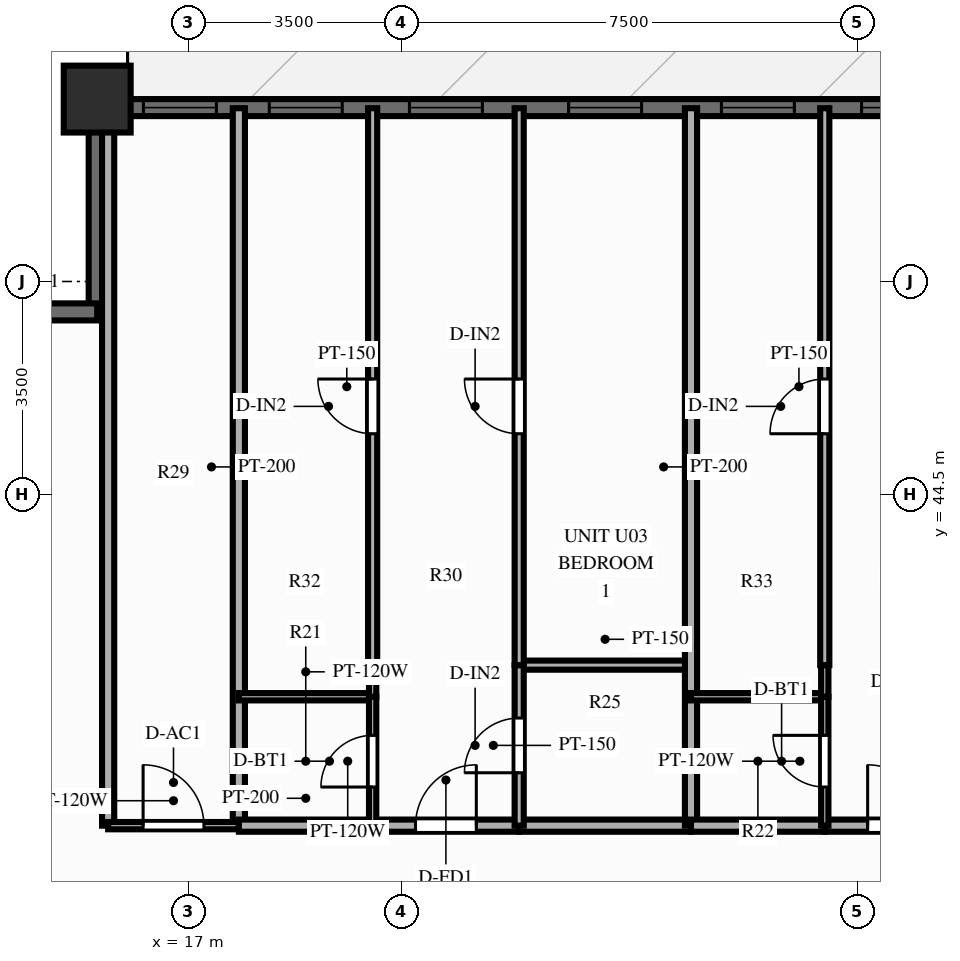
"""IFC4 building model, lengths in metres.
Left out: names, types, materials, properties, quantities, classifications, styles, units other than length and angle.
Written with IfcOpenShell. Run it as: python <this file> out.ifc"""

import sys

from ifc_helpers import new_model, si_unit, direction, frame, frame_2d, origin, origin_2d, place, context, subcontext, project, spatial, rectangle, extrude, source, transform, mapped, element, fill, save


model = new_model("IFC4")
c1 = context("Model", 3, precision=1e-05, world=origin(), true_north=direction((0.0, 1.0)))
c2 = subcontext(c1, "Body", "Model", "MODEL_VIEW")
j1 = project(units=[si_unit("LENGTHUNIT", "METRE"), si_unit("PLANEANGLEUNIT", "RADIAN")], contexts=[c1])
p1 = place(None, origin())
s1 = spatial("IfcSite", under=j1, at=p1, CompositionType="ELEMENT")
p2 = place(p1, origin())
s2 = spatial("IfcBuilding", under=s1, at=p2, CompositionType="ELEMENT")
p3 = place(p2, frame((0.0, 0.0, 46.4)))
s3 = spatial("IfcBuildingStorey", under=s2, at=p3, CompositionType="ELEMENT", Elevation=46.4)
m1 = source(origin(), c2, "Body", "SweptSolid", [
    extrude(rectangle(XDim=1.1, YDim=1.1, at=origin_2d()), origin(), (0.0, 0.0, 1.0), 3.0),
])
p4 = place(p3, frame((15.5, 51.0, 0.0), z_axis=(0.0, 0.0, 1.0), x_axis=(1.0, 0.0, 0.0)))
e1 = element("IfcColumn", 1, at=p4, inside=s3, PredefinedType="COLUMN", context=c2, shape_type="MappedRepresentation", body=[
    mapped(m1, transform((0.0, 0.0, 0.0), scale=1.0)),
])
p5 = place(p3, frame((15.5, 50.86, 0.0), z_axis=(0.0, 0.0, 1.0), x_axis=(1.0, 0.0, 0.0)))
e2 = element("IfcWall", 2, at=p5, inside=s3, PredefinedType="SOLIDWALL", context=c2, shape_type="SweptSolid", body=[
    extrude(rectangle(XDim=45.0, YDim=0.28, at=frame_2d((22.5, 0.0))), origin(), (0.0, 0.0, 1.0), 2.28),
])
p6 = place(p5, frame((0.76, 0.0, 0.25)))
e3 = element("IfcOpeningElement", 3, at=p6, cuts=e2, PredefinedType="OPENING", context=c2, shape_type="SweptSolid", body=[
    extrude(rectangle(XDim=1.2, YDim=1.5, at=frame_2d((0.6, 0.75))), frame((0.0, 0.152, 0.0), z_axis=(0.0, -1.0, 0.0), x_axis=(1.0, 0.0, 0.0)), (0.0, 0.0, 1.0), 0.304),
])
p7 = place(p5, frame((2.83, 0.0, 0.25)))
e4 = element("IfcOpeningElement", 4, at=p7, cuts=e2, PredefinedType="OPENING", context=c2, shape_type="SweptSolid", body=[
    extrude(rectangle(XDim=1.2, YDim=1.5, at=frame_2d((0.6, 0.75))), frame((0.0, 0.152, 0.0), z_axis=(0.0, -1.0, 0.0), x_axis=(1.0, 0.0, 0.0)), (0.0, 0.0, 1.0), 0.304),
])
p8 = place(p5, frame((5.135, 0.0, 0.25)))
e5 = element("IfcOpeningElement", 5, at=p8, cuts=e2, PredefinedType="OPENING", context=c2, shape_type="SweptSolid", body=[
    extrude(rectangle(XDim=1.2, YDim=1.5, at=frame_2d((0.6, 0.75))), frame((0.0, 0.152, 0.0), z_axis=(0.0, -1.0, 0.0), x_axis=(1.0, 0.0, 0.0)), (0.0, 0.0, 1.0), 0.304),
])
p9 = place(p5, frame((7.753, 0.0, 0.25)))
e6 = element("IfcOpeningElement", 6, at=p9, cuts=e2, PredefinedType="OPENING", context=c2, shape_type="SweptSolid", body=[
    extrude(rectangle(XDim=1.2, YDim=1.5, at=frame_2d((0.6, 0.75))), frame((0.0, 0.152, 0.0), z_axis=(0.0, -1.0, 0.0), x_axis=(1.0, 0.0, 0.0)), (0.0, 0.0, 1.0), 0.304),
])
p10 = place(p5, frame((10.266, 0.0, 0.25)))
e7 = element("IfcOpeningElement", 7, at=p10, cuts=e2, PredefinedType="OPENING", context=c2, shape_type="SweptSolid", body=[
    extrude(rectangle(XDim=1.2, YDim=1.5, at=frame_2d((0.6, 0.75))), frame((0.0, 0.152, 0.0), z_axis=(0.0, -1.0, 0.0), x_axis=(1.0, 0.0, 0.0)), (0.0, 0.0, 1.0), 0.304),
])
p11 = place(p5, frame((12.571, 0.0, 0.25)))
e8 = element("IfcOpeningElement", 8, at=p11, cuts=e2, PredefinedType="OPENING", context=c2, shape_type="SweptSolid", body=[
    extrude(rectangle(XDim=1.2, YDim=1.5, at=frame_2d((0.6, 0.75))), frame((0.0, 0.152, 0.0), z_axis=(0.0, -1.0, 0.0), x_axis=(1.0, 0.0, 0.0)), (0.0, 0.0, 1.0), 0.304),
])
p12 = place(p5, frame((14.643, 0.0, 0.25)))
e9 = element("IfcOpeningElement", 9, at=p12, cuts=e2, PredefinedType="OPENING", context=c2, shape_type="SweptSolid", body=[
    extrude(rectangle(XDim=0.7, YDim=1.5, at=frame_2d((0.35, 0.75))), frame((0.0, 0.152, 0.0), z_axis=(0.0, -1.0, 0.0), x_axis=(1.0, 0.0, 0.0)), (0.0, 0.0, 1.0), 0.304),
])
p13 = place(p5, frame((17.977, 0.0, 0.25)))
e10 = element("IfcOpeningElement", 10, at=p13, cuts=e2, PredefinedType="OPENING", context=c2, shape_type="SweptSolid", body=[
    extrude(rectangle(XDim=1.2, YDim=1.5, at=frame_2d((0.6, 0.75))), frame((0.0, 0.152, 0.0), z_axis=(0.0, -1.0, 0.0), x_axis=(1.0, 0.0, 0.0)), (0.0, 0.0, 1.0), 0.304),
])
p14 = place(p5, frame((23.263, 0.0, 0.0)))
e11 = element("IfcOpeningElement", 11, at=p14, cuts=e2, PredefinedType="OPENING", context=c2, shape_type="SweptSolid", body=[
    extrude(rectangle(XDim=1.1, YDim=2.15, at=frame_2d((0.55, 1.075))), frame((0.0, 0.152, 0.0), z_axis=(0.0, -1.0, 0.0), x_axis=(1.0, 0.0, 0.0)), (0.0, 0.0, 1.0), 0.304),
])
p15 = place(p5, frame((29.832, 0.0, 0.25)))
e12 = element("IfcOpeningElement", 12, at=p15, cuts=e2, PredefinedType="OPENING", context=c2, shape_type="SweptSolid", body=[
    extrude(rectangle(XDim=0.95, YDim=1.5, at=frame_2d((0.475, 0.75))), frame((0.0, 0.152, 0.0), z_axis=(0.0, -1.0, 0.0), x_axis=(1.0, 0.0, 0.0)), (0.0, 0.0, 1.0), 0.304),
])
p16 = place(p5, frame((31.998, 0.0, 0.25)))
e13 = element("IfcOpeningElement", 13, at=p16, cuts=e2, PredefinedType="OPENING", context=c2, shape_type="SweptSolid", body=[
    extrude(rectangle(XDim=1.2, YDim=1.5, at=frame_2d((0.6, 0.75))), frame((0.0, 0.152, 0.0), z_axis=(0.0, -1.0, 0.0), x_axis=(1.0, 0.0, 0.0)), (0.0, 0.0, 1.0), 0.304),
])
p17 = place(p5, frame((37.023, 0.0, 0.25)))
e14 = element("IfcOpeningElement", 14, at=p17, cuts=e2, PredefinedType="OPENING", context=c2, shape_type="SweptSolid", body=[
    extrude(rectangle(XDim=1.2, YDim=1.5, at=frame_2d((0.6, 0.75))), frame((0.0, 0.152, 0.0), z_axis=(0.0, -1.0, 0.0), x_axis=(1.0, 0.0, 0.0)), (0.0, 0.0, 1.0), 0.304),
])
p18 = place(p5, frame((42.341, 0.0, 0.25)))
e15 = element("IfcOpeningElement", 15, at=p18, cuts=e2, PredefinedType="OPENING", context=c2, shape_type="SweptSolid", body=[
    extrude(rectangle(XDim=1.2, YDim=1.5, at=frame_2d((0.6, 0.75))), frame((0.0, 0.152, 0.0), z_axis=(0.0, -1.0, 0.0), x_axis=(1.0, 0.0, 0.0)), (0.0, 0.0, 1.0), 0.304),
])
for number, where, z_axis, x_axis in (
    (16, (15.5, 47.5, 0.0), (0.0, 0.0, 1.0), (0.0, 1.0, 0.0)),
    (17, (12.08, 47.5, 0.0), (0.0, 0.0, 1.0), (1.0, 0.0, 0.0)),
):
    element("IfcWall", number, at=place(p3, frame(where, z_axis=z_axis, x_axis=x_axis)), inside=s3, PredefinedType="SOLIDWALL", context=c2, shape_type="SweptSolid", body=[
        extrude(rectangle(XDim=3.42, YDim=0.28, at=frame_2d((1.71, 0.0))), origin(), (0.0, 0.0, 1.0), 2.28),
    ])
for number, where, z_axis, x_axis in (
    (18, (15.68, 39.05, 0.0), (0.0, 0.0, 1.0), (0.0, 1.0, 0.0)),
    (19, (17.83, 39.05, 0.0), (0.0, 0.0, 1.0), (0.0, 1.0, 0.0)),
):
    element("IfcWall", number, at=place(p3, frame(where, z_axis=z_axis, x_axis=x_axis)), inside=s3, PredefinedType="PARTITIONING", context=c2, shape_type="SweptSolid", body=[
        extrude(rectangle(XDim=11.8, YDim=0.2, at=frame_2d((5.9, 0.0))), origin(), (0.0, 0.0, 1.0), 2.79),
    ])
p19 = place(p3, frame((15.68, 39.05, 0.0), z_axis=(0.0, 0.0, 1.0), x_axis=(1.0, 0.0, 0.0)))
e20 = element("IfcWall", 20, at=p19, inside=s3, PredefinedType="PARTITIONING", context=c2, shape_type="SweptSolid", body=[
    extrude(rectangle(XDim=2.15, YDim=0.12, at=frame_2d((1.075, 0.0))), origin(), (0.0, 0.0, 1.0), 2.79),
])
p20 = place(p19, frame((0.575, 0.0, 0.0)))
e21 = element("IfcOpeningElement", 21, at=p20, cuts=e20, PredefinedType="OPENING", context=c2, shape_type="SweptSolid", body=[
    extrude(rectangle(XDim=1.0, YDim=2.1, at=frame_2d((0.5, 1.05))), frame((0.0, 0.072, 0.0), z_axis=(0.0, -1.0, 0.0), x_axis=(1.0, 0.0, 0.0)), (0.0, 0.0, 1.0), 0.144),
])
p21 = place(p3, frame((17.83, 39.05, 0.0), z_axis=(0.0, 0.0, 1.0), x_axis=(1.0, 0.0, 0.0)))
e22 = element("IfcWall", 22, at=p21, inside=s3, PredefinedType="PARTITIONING", context=c2, shape_type="SweptSolid", body=[
    extrude(rectangle(XDim=2.2, YDim=0.2, at=frame_2d((1.1, 0.0))), origin(), (0.0, 0.0, 1.0), 2.79),
])
p22 = place(p3, frame((20.03, 39.05, 0.0), z_axis=(0.0, 0.0, 1.0), x_axis=(1.0, 0.0, 0.0)))
e23 = element("IfcWall", 23, at=p22, inside=s3, PredefinedType="PARTITIONING", context=c2, shape_type="SweptSolid", body=[
    extrude(rectangle(XDim=2.41, YDim=0.2, at=frame_2d((1.205, 0.0))), origin(), (0.0, 0.0, 1.0), 2.79),
])
p23 = place(p22, frame((0.705, 0.0, 0.0)))
e24 = element("IfcOpeningElement", 24, at=p23, cuts=e23, PredefinedType="OPENING", context=c2, shape_type="SweptSolid", body=[
    extrude(rectangle(XDim=1.0, YDim=2.15, at=frame_2d((0.5, 1.075))), frame((0.0, 0.112, 0.0), z_axis=(0.0, -1.0, 0.0), x_axis=(1.0, 0.0, 0.0)), (0.0, 0.0, 1.0), 0.224),
])
p24 = place(p3, frame((22.44, 39.05, 0.0), z_axis=(0.0, 0.0, 1.0), x_axis=(1.0, 0.0, 0.0)))
e25 = element("IfcWall", 25, at=p24, inside=s3, PredefinedType="PARTITIONING", context=c2, shape_type="SweptSolid", body=[
    extrude(rectangle(XDim=2.826, YDim=0.2, at=frame_2d((1.413, 0.0))), origin(), (0.0, 0.0, 1.0), 2.79),
])
p25 = place(p3, frame((17.83, 41.17, 0.0), z_axis=(0.0, 0.0, 1.0), x_axis=(1.0, 0.0, 0.0)))
e26 = element("IfcWall", 26, at=p25, inside=s3, PredefinedType="PARTITIONING", context=c2, shape_type="SweptSolid", body=[
    extrude(rectangle(XDim=2.2, YDim=0.12, at=frame_2d((1.1, 0.0))), origin(), (0.0, 0.0, 1.0), 2.79),
])
p26 = place(p3, frame((22.44, 41.69, 0.0), z_axis=(0.0, 0.0, 1.0), x_axis=(1.0, 0.0, 0.0)))
e27 = element("IfcWall", 27, at=p26, inside=s3, PredefinedType="PARTITIONING", context=c2, shape_type="SweptSolid", body=[
    extrude(rectangle(XDim=2.826, YDim=0.15, at=frame_2d((1.413, 0.0))), origin(), (0.0, 0.0, 1.0), 2.79),
])
p27 = place(p3, frame((20.03, 39.05, 0.0), z_axis=(0.0, 0.0, 1.0), x_axis=(0.0, 1.0, 0.0)))
e28 = element("IfcWall", 28, at=p27, inside=s3, PredefinedType="PARTITIONING", context=c2, shape_type="SweptSolid", body=[
    extrude(rectangle(XDim=2.12, YDim=0.12, at=frame_2d((1.06, 0.0))), origin(), (0.0, 0.0, 1.0), 2.79),
])
p28 = place(p27, frame((0.635, 0.0, 0.0)))
e29 = element("IfcOpeningElement", 29, at=p28, cuts=e28, PredefinedType="OPENING", context=c2, shape_type="SweptSolid", body=[
    extrude(rectangle(XDim=0.85, YDim=2.05, at=frame_2d((0.425, 1.025))), frame((0.0, 0.072, 0.0), z_axis=(0.0, -1.0, 0.0), x_axis=(1.0, 0.0, 0.0)), (0.0, 0.0, 1.0), 0.144),
])
p29 = place(p3, frame((20.03, 41.17, 0.0), z_axis=(0.0, 0.0, 1.0), x_axis=(0.0, 1.0, 0.0)))
e30 = element("IfcWall", 30, at=p29, inside=s3, PredefinedType="PARTITIONING", context=c2, shape_type="SweptSolid", body=[
    extrude(rectangle(XDim=0.52, YDim=0.12, at=frame_2d((0.26, 0.0))), origin(), (0.0, 0.0, 1.0), 2.79),
])
p30 = place(p3, frame((20.03, 41.69, 0.0), z_axis=(0.0, 0.0, 1.0), x_axis=(0.0, 1.0, 0.0)))
e31 = element("IfcWall", 31, at=p30, inside=s3, PredefinedType="PARTITIONING", context=c2, shape_type="SweptSolid", body=[
    extrude(rectangle(XDim=9.16, YDim=0.15, at=frame_2d((4.58, 0.0))), origin(), (0.0, 0.0, 1.0), 2.79),
])
p31 = place(p30, frame((3.806, 0.0, 0.0)))
e32 = element("IfcOpeningElement", 32, at=p31, cuts=e31, PredefinedType="OPENING", context=c2, shape_type="SweptSolid", body=[
    extrude(rectangle(XDim=0.9, YDim=2.1, at=frame_2d((0.45, 1.05))), frame((0.0, 0.087, 0.0), z_axis=(0.0, -1.0, 0.0), x_axis=(1.0, 0.0, 0.0)), (0.0, 0.0, 1.0), 0.174),
])
p32 = place(p3, frame((22.44, 39.05, 0.0), z_axis=(0.0, 0.0, 1.0), x_axis=(0.0, 1.0, 0.0)))
e33 = element("IfcWall", 33, at=p32, inside=s3, PredefinedType="PARTITIONING", context=c2, shape_type="SweptSolid", body=[
    extrude(rectangle(XDim=2.64, YDim=0.15, at=frame_2d((1.32, 0.0))), origin(), (0.0, 0.0, 1.0), 2.79),
])
p33 = place(p32, frame((0.87, 0.0, 0.0)))
e34 = element("IfcOpeningElement", 34, at=p33, cuts=e33, PredefinedType="OPENING", context=c2, shape_type="SweptSolid", body=[
    extrude(rectangle(XDim=0.9, YDim=2.1, at=frame_2d((0.45, 1.05))), frame((0.0, 0.087, 0.0), z_axis=(0.0, -1.0, 0.0), x_axis=(1.0, 0.0, 0.0)), (0.0, 0.0, 1.0), 0.174),
])
p34 = place(p3, frame((22.44, 41.69, 0.0), z_axis=(0.0, 0.0, 1.0), x_axis=(0.0, 1.0, 0.0)))
e35 = element("IfcWall", 35, at=p34, inside=s3, PredefinedType="PARTITIONING", context=c2, shape_type="SweptSolid", body=[
    extrude(rectangle(XDim=9.16, YDim=0.15, at=frame_2d((4.58, 0.0))), origin(), (0.0, 0.0, 1.0), 2.79),
])
p35 = place(p34, frame((3.806, 0.0, 0.0)))
e36 = element("IfcOpeningElement", 36, at=p35, cuts=e35, PredefinedType="OPENING", context=c2, shape_type="SweptSolid", body=[
    extrude(rectangle(XDim=0.9, YDim=2.1, at=frame_2d((0.45, 1.05))), frame((0.0, 0.087, 0.0), z_axis=(0.0, -1.0, 0.0), x_axis=(1.0, 0.0, 0.0)), (0.0, 0.0, 1.0), 0.174),
])
p36 = place(p3, frame((25.266, 39.05, 0.0), z_axis=(0.0, 0.0, 1.0), x_axis=(0.0, 1.0, 0.0)))
e37 = element("IfcWall", 37, at=p36, inside=s3, PredefinedType="PARTITIONING", context=c2, shape_type="SweptSolid", body=[
    extrude(rectangle(XDim=11.8, YDim=0.2, at=frame_2d((5.9, 0.0))), origin(), (0.0, 0.0, 1.0), 2.79),
])
p37 = place(p3, frame((25.266, 39.05, 0.0), z_axis=(0.0, 0.0, 1.0), x_axis=(1.0, 0.0, 0.0)))
e38 = element("IfcWall", 38, at=p37, inside=s3, PredefinedType="PARTITIONING", context=c2, shape_type="SweptSolid", body=[
    extrude(rectangle(XDim=2.2, YDim=0.2, at=frame_2d((1.1, 0.0))), origin(), (0.0, 0.0, 1.0), 2.79),
])
p38 = place(p3, frame((27.466, 39.05, 0.0), z_axis=(0.0, 0.0, 1.0), x_axis=(1.0, 0.0, 0.0)))
e39 = element("IfcWall", 39, at=p38, inside=s3, PredefinedType="PARTITIONING", context=c2, shape_type="SweptSolid", body=[
    extrude(rectangle(XDim=2.41, YDim=0.2, at=frame_2d((1.205, 0.0))), origin(), (0.0, 0.0, 1.0), 2.79),
])
p39 = place(p38, frame((0.705, 0.0, 0.0)))
e40 = element("IfcOpeningElement", 40, at=p39, cuts=e39, PredefinedType="OPENING", context=c2, shape_type="SweptSolid", body=[
    extrude(rectangle(XDim=1.0, YDim=2.15, at=frame_2d((0.5, 1.075))), frame((0.0, 0.112, 0.0), z_axis=(0.0, -1.0, 0.0), x_axis=(1.0, 0.0, 0.0)), (0.0, 0.0, 1.0), 0.224),
])
p40 = place(p3, frame((25.266, 41.17, 0.0), z_axis=(0.0, 0.0, 1.0), x_axis=(1.0, 0.0, 0.0)))
e41 = element("IfcWall", 41, at=p40, inside=s3, PredefinedType="PARTITIONING", context=c2, shape_type="SweptSolid", body=[
    extrude(rectangle(XDim=2.2, YDim=0.12, at=frame_2d((1.1, 0.0))), origin(), (0.0, 0.0, 1.0), 2.79),
])
p41 = place(p3, frame((27.466, 39.05, 0.0), z_axis=(0.0, 0.0, 1.0), x_axis=(0.0, 1.0, 0.0)))
e42 = element("IfcWall", 42, at=p41, inside=s3, PredefinedType="PARTITIONING", context=c2, shape_type="SweptSolid", body=[
    extrude(rectangle(XDim=2.12, YDim=0.12, at=frame_2d((1.06, 0.0))), origin(), (0.0, 0.0, 1.0), 2.79),
])
p42 = place(p41, frame((0.635, 0.0, 0.0)))
e43 = element("IfcOpeningElement", 43, at=p42, cuts=e42, PredefinedType="OPENING", context=c2, shape_type="SweptSolid", body=[
    extrude(rectangle(XDim=0.85, YDim=2.05, at=frame_2d((0.425, 1.025))), frame((0.0, 0.072, 0.0), z_axis=(0.0, -1.0, 0.0), x_axis=(1.0, 0.0, 0.0)), (0.0, 0.0, 1.0), 0.144),
])
p43 = place(p3, frame((27.466, 41.17, 0.0), z_axis=(0.0, 0.0, 1.0), x_axis=(0.0, 1.0, 0.0)))
e44 = element("IfcWall", 44, at=p43, inside=s3, PredefinedType="PARTITIONING", context=c2, shape_type="SweptSolid", body=[
    extrude(rectangle(XDim=0.52, YDim=0.12, at=frame_2d((0.26, 0.0))), origin(), (0.0, 0.0, 1.0), 2.79),
])
p44 = place(p3, frame((27.466, 41.69, 0.0), z_axis=(0.0, 0.0, 1.0), x_axis=(0.0, 1.0, 0.0)))
e45 = element("IfcWall", 45, at=p44, inside=s3, PredefinedType="PARTITIONING", context=c2, shape_type="SweptSolid", body=[
    extrude(rectangle(XDim=9.16, YDim=0.15, at=frame_2d((4.58, 0.0))), origin(), (0.0, 0.0, 1.0), 2.79),
])
p45 = place(p44, frame((3.806, 0.0, 0.0)))
e46 = element("IfcOpeningElement", 46, at=p45, cuts=e45, PredefinedType="OPENING", context=c2, shape_type="SweptSolid", body=[
    extrude(rectangle(XDim=0.9, YDim=2.1, at=frame_2d((0.45, 1.05))), frame((0.0, 0.087, 0.0), z_axis=(0.0, -1.0, 0.0), x_axis=(1.0, 0.0, 0.0)), (0.0, 0.0, 1.0), 0.174),
])
m2 = source(origin(), c2, "Body", "SweptSolid", [
    extrude(rectangle(XDim=1.2, YDim=1.5, at=frame_2d((0.6, 0.75))), frame((0.0, 0.03, 0.0), z_axis=(0.0, -1.0, 0.0), x_axis=(1.0, 0.0, 0.0)), (0.0, 0.0, 1.0), 0.06),
])
p46 = place(p6, origin())
e47 = element("IfcWindow", 47, at=p46, inside=s3, PartitioningType="SINGLE_PANEL", PredefinedType="WINDOW", context=c2, shape_type="MappedRepresentation", body=[
    mapped(m2, transform((0.0, 0.0, 0.0), scale=1.0)),
])
fill(e3, e47)
p47 = place(p7, origin())
e48 = element("IfcWindow", 48, at=p47, inside=s3, PartitioningType="SINGLE_PANEL", PredefinedType="WINDOW", context=c2, shape_type="MappedRepresentation", body=[
    mapped(m2, transform((0.0, 0.0, 0.0), scale=1.0)),
])
fill(e4, e48)
p48 = place(p8, origin())
e49 = element("IfcWindow", 49, at=p48, inside=s3, PartitioningType="SINGLE_PANEL", PredefinedType="WINDOW", context=c2, shape_type="MappedRepresentation", body=[
    mapped(m2, transform((0.0, 0.0, 0.0), scale=1.0)),
])
fill(e5, e49)
p49 = place(p9, origin())
e50 = element("IfcWindow", 50, at=p49, inside=s3, PartitioningType="SINGLE_PANEL", PredefinedType="WINDOW", context=c2, shape_type="MappedRepresentation", body=[
    mapped(m2, transform((0.0, 0.0, 0.0), scale=1.0)),
])
fill(e6, e50)
p50 = place(p10, origin())
e51 = element("IfcWindow", 51, at=p50, inside=s3, PartitioningType="SINGLE_PANEL", PredefinedType="WINDOW", context=c2, shape_type="MappedRepresentation", body=[
    mapped(m2, transform((0.0, 0.0, 0.0), scale=1.0)),
])
fill(e7, e51)
p51 = place(p11, origin())
e52 = element("IfcWindow", 52, at=p51, inside=s3, PartitioningType="SINGLE_PANEL", PredefinedType="WINDOW", context=c2, shape_type="MappedRepresentation", body=[
    mapped(m2, transform((0.0, 0.0, 0.0), scale=1.0)),
])
fill(e8, e52)
m3 = source(origin(), c2, "Body", "SweptSolid", [
    extrude(rectangle(XDim=1.0, YDim=2.1, at=frame_2d((0.5, 1.05))), frame((0.0, 0.025, 0.0), z_axis=(0.0, -1.0, 0.0), x_axis=(1.0, 0.0, 0.0)), (0.0, 0.0, 1.0), 0.05),
])
p52 = place(p20, origin())
e53 = element("IfcDoor", 53, at=p52, inside=s3, OperationType="SINGLE_SWING_LEFT", PredefinedType="DOOR", context=c2, shape_type="MappedRepresentation", body=[
    mapped(m3, transform((0.0, 0.0, 0.0), scale=1.0)),
])
fill(e21, e53)
m4 = source(origin(), c2, "Body", "SweptSolid", [
    extrude(rectangle(XDim=1.0, YDim=2.15, at=frame_2d((0.5, 1.075))), frame((0.0, 0.025, 0.0), z_axis=(0.0, -1.0, 0.0), x_axis=(1.0, 0.0, 0.0)), (0.0, 0.0, 1.0), 0.05),
])
p53 = place(p23, origin())
e54 = element("IfcDoor", 54, at=p53, inside=s3, OperationType="SINGLE_SWING_RIGHT", PredefinedType="DOOR", context=c2, shape_type="MappedRepresentation", body=[
    mapped(m4, transform((0.0, 0.0, 0.0), scale=1.0)),
])
fill(e24, e54)
m5 = source(origin(), c2, "Body", "SweptSolid", [
    extrude(rectangle(XDim=0.85, YDim=2.05, at=frame_2d((0.425, 1.025))), frame((0.0, 0.025, 0.0), z_axis=(0.0, -1.0, 0.0), x_axis=(1.0, 0.0, 0.0)), (0.0, 0.0, 1.0), 0.05),
])
p54 = place(p28, origin())
e55 = element("IfcDoor", 55, at=p54, inside=s3, OperationType="SINGLE_SWING_LEFT", PredefinedType="DOOR", context=c2, shape_type="MappedRepresentation", body=[
    mapped(m5, transform((0.0, 0.0, 0.0), scale=1.0)),
])
fill(e29, e55)
m6 = source(origin(), c2, "Body", "SweptSolid", [
    extrude(rectangle(XDim=0.9, YDim=2.1, at=frame_2d((0.45, 1.05))), frame((0.0, 0.025, 0.0), z_axis=(0.0, -1.0, 0.0), x_axis=(1.0, 0.0, 0.0)), (0.0, 0.0, 1.0), 0.05),
])
p55 = place(p31, origin())
e56 = element("IfcDoor", 56, at=p55, inside=s3, OperationType="SINGLE_SWING_RIGHT", PredefinedType="DOOR", context=c2, shape_type="MappedRepresentation", body=[
    mapped(m6, transform((0.0, 0.0, 0.0), scale=1.0)),
])
fill(e32, e56)
p56 = place(p33, origin())
e57 = element("IfcDoor", 57, at=p56, inside=s3, OperationType="SINGLE_SWING_LEFT", PredefinedType="DOOR", context=c2, shape_type="MappedRepresentation", body=[
    mapped(m6, transform((0.0, 0.0, 0.0), scale=1.0)),
])
fill(e34, e57)
p57 = place(p35, origin())
e58 = element("IfcDoor", 58, at=p57, inside=s3, OperationType="SINGLE_SWING_RIGHT", PredefinedType="DOOR", context=c2, shape_type="MappedRepresentation", body=[
    mapped(m6, transform((0.0, 0.0, 0.0), scale=1.0)),
])
fill(e36, e58)
p58 = place(p39, origin())
e59 = element("IfcDoor", 59, at=p58, inside=s3, OperationType="SINGLE_SWING_LEFT", PredefinedType="DOOR", context=c2, shape_type="MappedRepresentation", body=[
    mapped(m4, transform((0.0, 0.0, 0.0), scale=1.0)),
])
fill(e40, e59)
p59 = place(p42, origin())
e60 = element("IfcDoor", 60, at=p59, inside=s3, OperationType="SINGLE_SWING_RIGHT", PredefinedType="DOOR", context=c2, shape_type="MappedRepresentation", body=[
    mapped(m5, transform((0.0, 0.0, 0.0), scale=1.0)),
])
fill(e43, e60)
p60 = place(p45, origin())
e61 = element("IfcDoor", 61, at=p60, inside=s3, OperationType="SINGLE_SWING_LEFT", PredefinedType="DOOR", context=c2, shape_type="MappedRepresentation", body=[
    mapped(m6, transform((0.0, 0.0, 0.0), scale=1.0)),
])
fill(e46, e61)
save(model, sys.argv[1])
